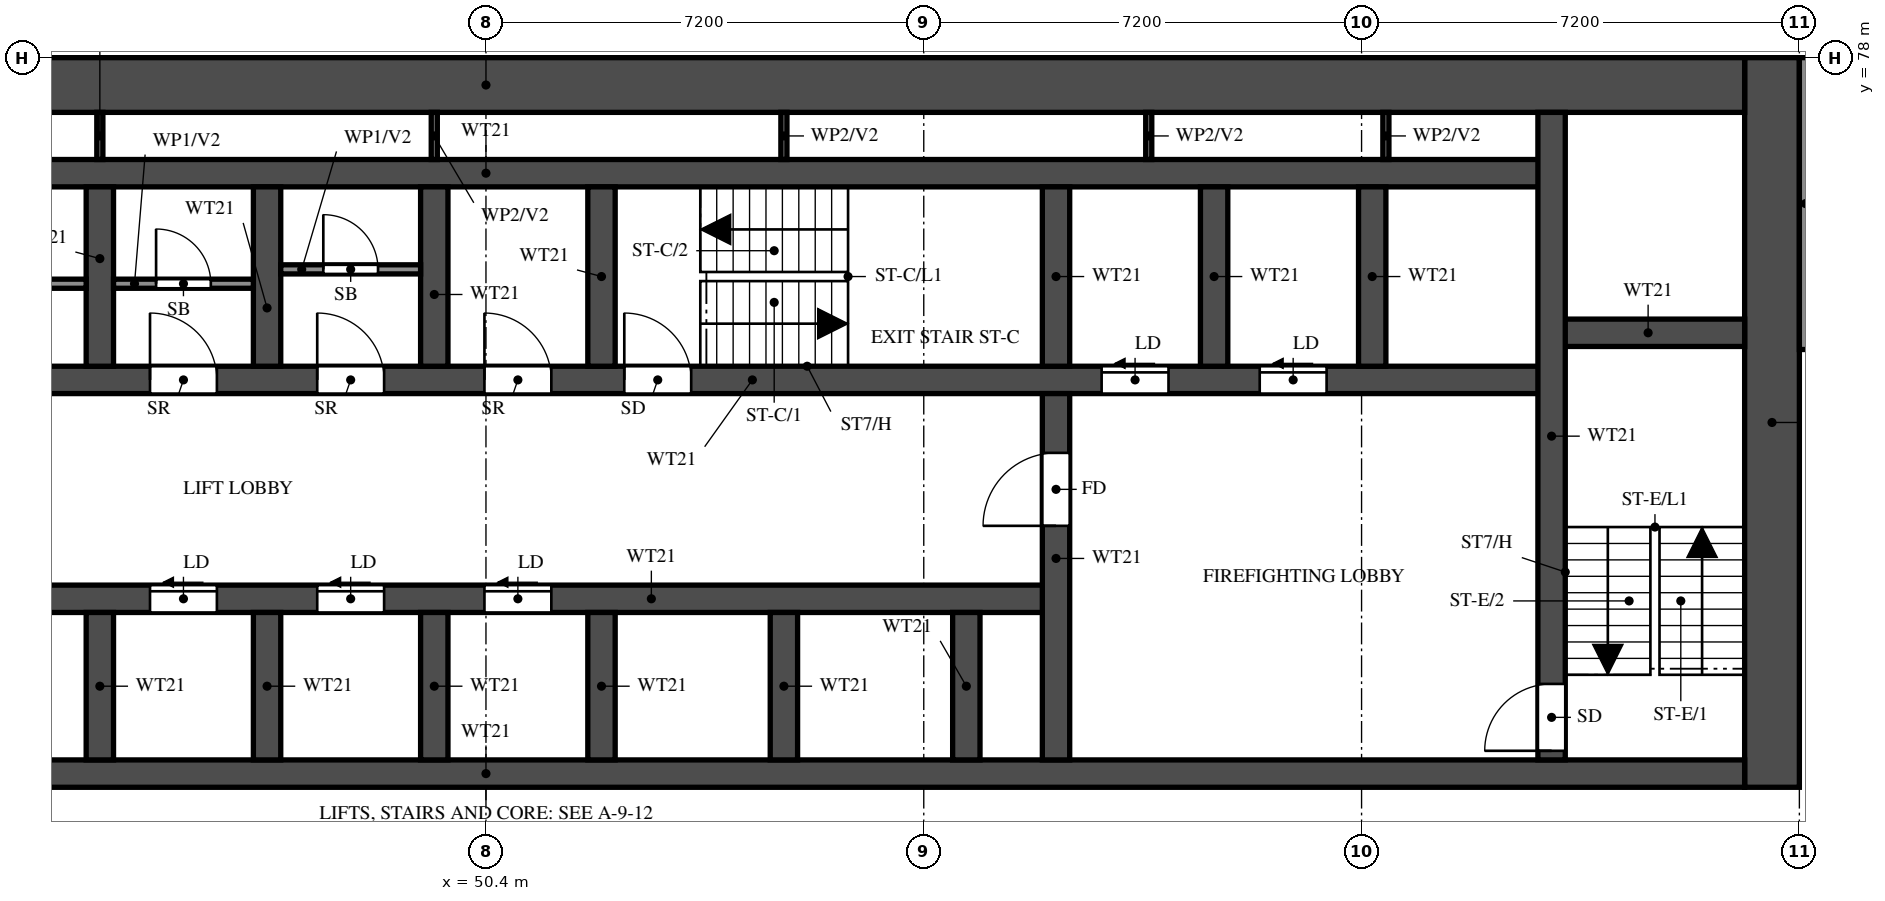
"""IFC4 building model, lengths in metres.
Left out: names, types, materials, properties, quantities, classifications, styles, units other than length and angle.
Written with IfcOpenShell. Run it as: python <this file> out.ifc"""

import sys

from ifc_helpers import new_model, si_unit, direction, frame, frame_2d, origin, place, context, subcontext, project, spatial, rectangle, extrude, element, fill, save


model = new_model("IFC4")
c1 = context("Model", 3, precision=1e-05, world=origin(), true_north=direction((0.0, 1.0)))
c2 = subcontext(c1, "Body", "Model", "MODEL_VIEW")
j1 = project(units=[si_unit("LENGTHUNIT", "METRE"), si_unit("PLANEANGLEUNIT", "RADIAN")], contexts=[c1])
p1 = place(None, origin())
s1 = spatial("IfcSite", under=j1, at=p1, CompositionType="ELEMENT")
p2 = place(p1, origin())
s2 = spatial("IfcBuilding", under=s1, at=p2, CompositionType="ELEMENT")
p3 = place(p2, frame((0.0, 0.0, 79.5)))
s3 = spatial("IfcBuildingStorey", under=s2, at=p3, CompositionType="ELEMENT", Elevation=79.5)
p4 = place(p3, frame((71.55, 66.0, 0.0), z_axis=(0.0, 0.0, 1.0), x_axis=(0.0, 1.0, 0.0)))
e1 = element("IfcWall", 1, at=p4, inside=s3, PredefinedType="SHEAR", context=c2, shape_type="SweptSolid", body=[
    extrude(rectangle(XDim=12.0, YDim=0.9, at=frame_2d((6.0, 0.0))), origin(), (0.0, 0.0, 1.0), 3.18),
])
p5 = place(p3, frame((29.7, 77.55, 0.0), z_axis=(0.0, 0.0, 1.0), x_axis=(1.0, 0.0, 0.0)))
e2 = element("IfcWall", 2, at=p5, inside=s3, PredefinedType="SHEAR", context=c2, shape_type="SweptSolid", body=[
    extrude(rectangle(XDim=41.4, YDim=0.9, at=frame_2d((20.7, 0.0))), origin(), (0.0, 0.0, 1.0), 3.18),
])
p6 = place(p3, frame((29.7, 66.225, 0.0), z_axis=(0.0, 0.0, 1.0), x_axis=(1.0, 0.0, 0.0)))
e3 = element("IfcWall", 3, at=p6, inside=s3, PredefinedType="SHEAR", context=c2, shape_type="SweptSolid", body=[
    extrude(rectangle(XDim=41.4, YDim=0.45, at=frame_2d((20.7, 0.0))), origin(), (0.0, 0.0, 1.0), 3.18),
])
p7 = place(p6, frame((0.925, 0.0, 0.0)))
e4 = element("IfcOpeningElement", 4, at=p7, cuts=e3, PredefinedType="OPENING", context=c2, shape_type="SweptSolid", body=[
    extrude(rectangle(XDim=1.1, YDim=2.1, at=frame_2d((0.55, 1.05))), frame((0.0, 0.235, 0.0), z_axis=(0.0, -1.0, 0.0), x_axis=(1.0, 0.0, 0.0)), (0.0, 0.0, 1.0), 0.47),
])
p8 = place(p6, frame((3.738, 0.0, 0.0)))
e5 = element("IfcOpeningElement", 5, at=p8, cuts=e3, PredefinedType="OPENING", context=c2, shape_type="SweptSolid", body=[
    extrude(rectangle(XDim=1.8, YDim=2.1, at=frame_2d((0.9, 1.05))), frame((0.0, 0.235, 0.0), z_axis=(0.0, -1.0, 0.0), x_axis=(1.0, 0.0, 0.0)), (0.0, 0.0, 1.0), 0.47),
])
p9 = place(p3, frame((35.575, 69.1, 0.0), z_axis=(0.0, 0.0, 1.0), x_axis=(1.0, 0.0, 0.0)))
e6 = element("IfcWall", 6, at=p9, inside=s3, PredefinedType="SHEAR", context=c2, shape_type="SweptSolid", body=[
    extrude(rectangle(XDim=24.2, YDim=0.45, at=frame_2d((12.1, 0.0))), origin(), (0.0, 0.0, 1.0), 3.18),
])
p10 = place(p9, frame((1.05, 0.0, 0.0)))
e7 = element("IfcOpeningElement", 7, at=p10, cuts=e6, PredefinedType="OPENING", context=c2, shape_type="SweptSolid", body=[
    extrude(rectangle(XDim=1.1, YDim=2.1, at=frame_2d((0.55, 1.05))), frame((0.0, 0.235, 0.0), z_axis=(0.0, -1.0, 0.0), x_axis=(1.0, 0.0, 0.0)), (0.0, 0.0, 1.0), 0.47),
])
p11 = place(p9, frame((3.8, 0.0, 0.0)))
e8 = element("IfcOpeningElement", 8, at=p11, cuts=e6, PredefinedType="OPENING", context=c2, shape_type="SweptSolid", body=[
    extrude(rectangle(XDim=1.1, YDim=2.1, at=frame_2d((0.55, 1.05))), frame((0.0, 0.235, 0.0), z_axis=(0.0, -1.0, 0.0), x_axis=(1.0, 0.0, 0.0)), (0.0, 0.0, 1.0), 0.47),
])
p12 = place(p9, frame((6.55, 0.0, 0.0)))
e9 = element("IfcOpeningElement", 9, at=p12, cuts=e6, PredefinedType="OPENING", context=c2, shape_type="SweptSolid", body=[
    extrude(rectangle(XDim=1.1, YDim=2.1, at=frame_2d((0.55, 1.05))), frame((0.0, 0.235, 0.0), z_axis=(0.0, -1.0, 0.0), x_axis=(1.0, 0.0, 0.0)), (0.0, 0.0, 1.0), 0.47),
])
p13 = place(p9, frame((9.3, 0.0, 0.0)))
e10 = element("IfcOpeningElement", 10, at=p13, cuts=e6, PredefinedType="OPENING", context=c2, shape_type="SweptSolid", body=[
    extrude(rectangle(XDim=1.1, YDim=2.1, at=frame_2d((0.55, 1.05))), frame((0.0, 0.235, 0.0), z_axis=(0.0, -1.0, 0.0), x_axis=(1.0, 0.0, 0.0)), (0.0, 0.0, 1.0), 0.47),
])
p14 = place(p9, frame((12.05, 0.0, 0.0)))
e11 = element("IfcOpeningElement", 11, at=p14, cuts=e6, PredefinedType="OPENING", context=c2, shape_type="SweptSolid", body=[
    extrude(rectangle(XDim=1.1, YDim=2.1, at=frame_2d((0.55, 1.05))), frame((0.0, 0.235, 0.0), z_axis=(0.0, -1.0, 0.0), x_axis=(1.0, 0.0, 0.0)), (0.0, 0.0, 1.0), 0.47),
])
p15 = place(p9, frame((14.8, 0.0, 0.0)))
e12 = element("IfcOpeningElement", 12, at=p15, cuts=e6, PredefinedType="OPENING", context=c2, shape_type="SweptSolid", body=[
    extrude(rectangle(XDim=1.1, YDim=2.1, at=frame_2d((0.55, 1.05))), frame((0.0, 0.235, 0.0), z_axis=(0.0, -1.0, 0.0), x_axis=(1.0, 0.0, 0.0)), (0.0, 0.0, 1.0), 0.47),
])
p16 = place(p3, frame((32.875, 72.7, 0.0), z_axis=(0.0, 0.0, 1.0), x_axis=(1.0, 0.0, 0.0)))
e13 = element("IfcWall", 13, at=p16, inside=s3, PredefinedType="SHEAR", context=c2, shape_type="SweptSolid", body=[
    extrude(rectangle(XDim=35.05, YDim=0.45, at=frame_2d((17.525, 0.0))), origin(), (0.0, 0.0, 1.0), 3.18),
])
p17 = place(p16, frame((19.8, 0.0, 0.0)))
e14 = element("IfcOpeningElement", 14, at=p17, cuts=e13, PredefinedType="OPENING", context=c2, shape_type="SweptSolid", body=[
    extrude(rectangle(XDim=1.1, YDim=2.1, at=frame_2d((0.55, 1.05))), frame((0.0, 0.235, 0.0), z_axis=(0.0, -1.0, 0.0), x_axis=(1.0, 0.0, 0.0)), (0.0, 0.0, 1.0), 0.47),
])
p18 = place(p16, frame((27.65, 0.0, 0.0)))
e15 = element("IfcOpeningElement", 15, at=p18, cuts=e13, PredefinedType="OPENING", context=c2, shape_type="SweptSolid", body=[
    extrude(rectangle(XDim=1.1, YDim=2.1, at=frame_2d((0.55, 1.05))), frame((0.0, 0.235, 0.0), z_axis=(0.0, -1.0, 0.0), x_axis=(1.0, 0.0, 0.0)), (0.0, 0.0, 1.0), 0.47),
])
p19 = place(p16, frame((30.25, 0.0, 0.0)))
e16 = element("IfcOpeningElement", 16, at=p19, cuts=e13, PredefinedType="OPENING", context=c2, shape_type="SweptSolid", body=[
    extrude(rectangle(XDim=1.1, YDim=2.1, at=frame_2d((0.55, 1.05))), frame((0.0, 0.235, 0.0), z_axis=(0.0, -1.0, 0.0), x_axis=(1.0, 0.0, 0.0)), (0.0, 0.0, 1.0), 0.47),
])
p20 = place(p16, frame((3.75, 0.0, 0.0)))
e17 = element("IfcOpeningElement", 17, at=p20, cuts=e13, PredefinedType="OPENING", context=c2, shape_type="SweptSolid", body=[
    extrude(rectangle(XDim=1.1, YDim=2.1, at=frame_2d((0.55, 1.05))), frame((0.0, 0.235, 0.0), z_axis=(0.0, -1.0, 0.0), x_axis=(1.0, 0.0, 0.0)), (0.0, 0.0, 1.0), 0.47),
])
p21 = place(p16, frame((6.5, 0.0, 0.0)))
e18 = element("IfcOpeningElement", 18, at=p21, cuts=e13, PredefinedType="OPENING", context=c2, shape_type="SweptSolid", body=[
    extrude(rectangle(XDim=1.1, YDim=2.1, at=frame_2d((0.55, 1.05))), frame((0.0, 0.235, 0.0), z_axis=(0.0, -1.0, 0.0), x_axis=(1.0, 0.0, 0.0)), (0.0, 0.0, 1.0), 0.47),
])
p22 = place(p16, frame((9.25, 0.0, 0.0)))
e19 = element("IfcOpeningElement", 19, at=p22, cuts=e13, PredefinedType="OPENING", context=c2, shape_type="SweptSolid", body=[
    extrude(rectangle(XDim=1.1, YDim=2.1, at=frame_2d((0.55, 1.05))), frame((0.0, 0.235, 0.0), z_axis=(0.0, -1.0, 0.0), x_axis=(1.0, 0.0, 0.0)), (0.0, 0.0, 1.0), 0.47),
])
p23 = place(p16, frame((12.0, 0.0, 0.0)))
e20 = element("IfcOpeningElement", 20, at=p23, cuts=e13, PredefinedType="OPENING", context=c2, shape_type="SweptSolid", body=[
    extrude(rectangle(XDim=1.1, YDim=2.1, at=frame_2d((0.55, 1.05))), frame((0.0, 0.235, 0.0), z_axis=(0.0, -1.0, 0.0), x_axis=(1.0, 0.0, 0.0)), (0.0, 0.0, 1.0), 0.47),
])
p24 = place(p16, frame((14.75, 0.0, 0.0)))
e21 = element("IfcOpeningElement", 21, at=p24, cuts=e13, PredefinedType="OPENING", context=c2, shape_type="SweptSolid", body=[
    extrude(rectangle(XDim=1.1, YDim=2.1, at=frame_2d((0.55, 1.05))), frame((0.0, 0.235, 0.0), z_axis=(0.0, -1.0, 0.0), x_axis=(1.0, 0.0, 0.0)), (0.0, 0.0, 1.0), 0.47),
])
p25 = place(p16, frame((17.5, 0.0, 0.0)))
e22 = element("IfcOpeningElement", 22, at=p25, cuts=e13, PredefinedType="OPENING", context=c2, shape_type="SweptSolid", body=[
    extrude(rectangle(XDim=1.1, YDim=2.1, at=frame_2d((0.55, 1.05))), frame((0.0, 0.235, 0.0), z_axis=(0.0, -1.0, 0.0), x_axis=(1.0, 0.0, 0.0)), (0.0, 0.0, 1.0), 0.47),
])
p26 = place(p16, frame((0.913, 0.0, 0.0)))
e23 = element("IfcOpeningElement", 23, at=p26, cuts=e13, PredefinedType="OPENING", context=c2, shape_type="SweptSolid", body=[
    extrude(rectangle(XDim=1.1, YDim=2.1, at=frame_2d((0.55, 1.05))), frame((0.0, 0.235, 0.0), z_axis=(0.0, -1.0, 0.0), x_axis=(1.0, 0.0, 0.0)), (0.0, 0.0, 1.0), 0.47),
])
p27 = place(p3, frame((32.875, 76.1, 0.0), z_axis=(0.0, 0.0, 1.0), x_axis=(1.0, 0.0, 0.0)))
e24 = element("IfcWall", 24, at=p27, inside=s3, PredefinedType="SHEAR", context=c2, shape_type="SweptSolid", body=[
    extrude(rectangle(XDim=35.05, YDim=0.45, at=frame_2d((17.525, 0.0))), origin(), (0.0, 0.0, 1.0), 3.18),
])
p28 = place(p3, frame((67.925, 73.475, 0.0), z_axis=(0.0, 0.0, 1.0), x_axis=(1.0, 0.0, 0.0)))
e25 = element("IfcWall", 25, at=p28, inside=s3, PredefinedType="SHEAR", context=c2, shape_type="SweptSolid", body=[
    extrude(rectangle(XDim=3.175, YDim=0.45, at=frame_2d((1.587, 0.0))), origin(), (0.0, 0.0, 1.0), 3.18),
])
p29 = place(p3, frame((67.925, 66.45, 0.0), z_axis=(0.0, 0.0, 1.0), x_axis=(0.0, 1.0, 0.0)))
e26 = element("IfcWall", 26, at=p29, inside=s3, PredefinedType="SHEAR", context=c2, shape_type="SweptSolid", body=[
    extrude(rectangle(XDim=10.65, YDim=0.45, at=frame_2d((5.325, 0.0))), origin(), (0.0, 0.0, 1.0), 3.18),
])
p30 = place(p29, frame((0.15, 0.0, 0.0)))
e27 = element("IfcOpeningElement", 27, at=p30, cuts=e26, PredefinedType="OPENING", context=c2, shape_type="SweptSolid", body=[
    extrude(rectangle(XDim=1.1, YDim=2.1, at=frame_2d((0.55, 1.05))), frame((0.0, 0.235, 0.0), z_axis=(0.0, -1.0, 0.0), x_axis=(1.0, 0.0, 0.0)), (0.0, 0.0, 1.0), 0.47),
])
p31 = place(p3, frame((59.775, 66.45, 0.0), z_axis=(0.0, 0.0, 1.0), x_axis=(0.0, 1.0, 0.0)))
e28 = element("IfcWall", 28, at=p31, inside=s3, PredefinedType="SHEAR", context=c2, shape_type="SweptSolid", body=[
    extrude(rectangle(XDim=6.025, YDim=0.45, at=frame_2d((3.013, 0.0))), origin(), (0.0, 0.0, 1.0), 3.18),
])
p32 = place(p31, frame((3.85, 0.0, 0.0)))
e29 = element("IfcOpeningElement", 29, at=p32, cuts=e28, PredefinedType="OPENING", context=c2, shape_type="SweptSolid", body=[
    extrude(rectangle(XDim=1.2, YDim=2.1, at=frame_2d((0.6, 1.05))), frame((0.0, 0.235, 0.0), z_axis=(0.0, -1.0, 0.0), x_axis=(1.0, 0.0, 0.0)), (0.0, 0.0, 1.0), 0.47),
])
p33 = place(p3, frame((59.775, 72.925, 0.0), z_axis=(0.0, 0.0, 1.0), x_axis=(0.0, 1.0, 0.0)))
e30 = element("IfcWall", 30, at=p33, inside=s3, PredefinedType="SHEAR", context=c2, shape_type="SweptSolid", body=[
    extrude(rectangle(XDim=2.95, YDim=0.45, at=frame_2d((1.475, 0.0))), origin(), (0.0, 0.0, 1.0), 3.18),
])
for number, where, z_axis, x_axis in (
    (31, (44.05, 66.45, 0.0), (0.0, 0.0, 1.0), (0.0, 1.0, 0.0)),
    (32, (46.8, 66.45, 0.0), (0.0, 0.0, 1.0), (0.0, 1.0, 0.0)),
    (33, (49.55, 66.45, 0.0), (0.0, 0.0, 1.0), (0.0, 1.0, 0.0)),
    (34, (52.3, 66.45, 0.0), (0.0, 0.0, 1.0), (0.0, 1.0, 0.0)),
    (35, (55.3, 66.45, 0.0), (0.0, 0.0, 1.0), (0.0, 1.0, 0.0)),
    (36, (58.3, 66.45, 0.0), (0.0, 0.0, 1.0), (0.0, 1.0, 0.0)),
):
    element("IfcWall", number, at=place(p3, frame(where, z_axis=z_axis, x_axis=x_axis)), inside=s3, PredefinedType="SHEAR", context=c2, shape_type="SweptSolid", body=[
        extrude(rectangle(XDim=2.425, YDim=0.45, at=frame_2d((1.212, 0.0))), origin(), (0.0, 0.0, 1.0), 3.18),
    ])
for number, where, z_axis, x_axis in (
    (37, (44.05, 72.925, 0.0), (0.0, 0.0, 1.0), (0.0, 1.0, 0.0)),
    (38, (46.8, 72.925, 0.0), (0.0, 0.0, 1.0), (0.0, 1.0, 0.0)),
    (39, (49.55, 72.925, 0.0), (0.0, 0.0, 1.0), (0.0, 1.0, 0.0)),
    (40, (52.3, 72.925, 0.0), (0.0, 0.0, 1.0), (0.0, 1.0, 0.0)),
    (41, (62.375, 72.925, 0.0), (0.0, 0.0, 1.0), (0.0, 1.0, 0.0)),
    (42, (64.975, 72.925, 0.0), (0.0, 0.0, 1.0), (0.0, 1.0, 0.0)),
):
    element("IfcWall", number, at=place(p3, frame(where, z_axis=z_axis, x_axis=x_axis)), inside=s3, PredefinedType="SHEAR", context=c2, shape_type="SweptSolid", body=[
        extrude(rectangle(XDim=2.95, YDim=0.45, at=frame_2d((1.475, 0.0))), origin(), (0.0, 0.0, 1.0), 3.18),
    ])
p34 = place(p3, frame((41.525, 74.282, 0.0), z_axis=(0.0, 0.0, 1.0), x_axis=(1.0, 0.0, 0.0)))
e43 = element("IfcWall", 43, at=p34, inside=s3, PredefinedType="PARTITIONING", context=c2, shape_type="SweptSolid", body=[
    extrude(rectangle(XDim=2.3, YDim=0.15, at=frame_2d((1.15, 0.0))), origin(), (0.0, 0.0, 1.0), 3.18),
])
p35 = place(p34, frame((0.7, 0.0, 0.0)))
e44 = element("IfcOpeningElement", 44, at=p35, cuts=e43, PredefinedType="OPENING", context=c2, shape_type="SweptSolid", body=[
    extrude(rectangle(XDim=0.9, YDim=2.1, at=frame_2d((0.45, 1.05))), frame((0.0, 0.085, 0.0), z_axis=(0.0, -1.0, 0.0), x_axis=(1.0, 0.0, 0.0)), (0.0, 0.0, 1.0), 0.17),
])
p36 = place(p3, frame((44.275, 74.282, 0.0), z_axis=(0.0, 0.0, 1.0), x_axis=(1.0, 0.0, 0.0)))
e45 = element("IfcWall", 45, at=p36, inside=s3, PredefinedType="PARTITIONING", context=c2, shape_type="SweptSolid", body=[
    extrude(rectangle(XDim=2.3, YDim=0.15, at=frame_2d((1.15, 0.0))), origin(), (0.0, 0.0, 1.0), 3.18),
])
p37 = place(p36, frame((0.7, 0.0, 0.0)))
e46 = element("IfcOpeningElement", 46, at=p37, cuts=e45, PredefinedType="OPENING", context=c2, shape_type="SweptSolid", body=[
    extrude(rectangle(XDim=0.9, YDim=2.1, at=frame_2d((0.45, 1.05))), frame((0.0, 0.085, 0.0), z_axis=(0.0, -1.0, 0.0), x_axis=(1.0, 0.0, 0.0)), (0.0, 0.0, 1.0), 0.17),
])
p38 = place(p3, frame((47.025, 74.518, 0.0), z_axis=(0.0, 0.0, 1.0), x_axis=(1.0, 0.0, 0.0)))
e47 = element("IfcWall", 47, at=p38, inside=s3, PredefinedType="PARTITIONING", context=c2, shape_type="SweptSolid", body=[
    extrude(rectangle(XDim=2.3, YDim=0.15, at=frame_2d((1.15, 0.0))), origin(), (0.0, 0.0, 1.0), 3.18),
])
p39 = place(p38, frame((0.7, 0.0, 0.0)))
e48 = element("IfcOpeningElement", 48, at=p39, cuts=e47, PredefinedType="OPENING", context=c2, shape_type="SweptSolid", body=[
    extrude(rectangle(XDim=0.9, YDim=2.1, at=frame_2d((0.45, 1.05))), frame((0.0, 0.085, 0.0), z_axis=(0.0, -1.0, 0.0), x_axis=(1.0, 0.0, 0.0)), (0.0, 0.0, 1.0), 0.17),
])
for number, where, z_axis, x_axis in (
    (49, (44.05, 76.325, 0.0), (0.0, 0.0, 1.0), (0.0, 1.0, 0.0)),
    (50, (49.55, 76.325, 0.0), (0.0, 0.0, 1.0), (0.0, 1.0, 0.0)),
    (51, (55.3, 76.325, 0.0), (0.0, 0.0, 1.0), (0.0, 1.0, 0.0)),
    (52, (61.3, 76.325, 0.0), (0.0, 0.0, 1.0), (0.0, 1.0, 0.0)),
    (53, (65.2, 76.325, 0.0), (0.0, 0.0, 1.0), (0.0, 1.0, 0.0)),
):
    element("IfcWall", number, at=place(p3, frame(where, z_axis=z_axis, x_axis=x_axis)), inside=s3, PredefinedType="PARTITIONING", context=c2, shape_type="SweptSolid", body=[
        extrude(rectangle(XDim=0.775, YDim=0.1, at=frame_2d((0.388, 0.0))), origin(), (0.0, 0.0, 1.0), 3.18),
    ])
p40 = place(p3, frame((72.1, 73.2, 0.0), z_axis=(0.0, 0.0, 1.0), x_axis=(0.0, 1.0, 0.0)))
e54 = element("IfcWall", 54, at=p40, inside=s3, PredefinedType="SOLIDWALL", context=c2, shape_type="SweptSolid", body=[
    extrude(rectangle(XDim=4.8, YDim=0.2, at=frame_2d((2.4, 0.0))), origin(), (0.0, 0.0, 1.0), 3.18),
])
p41 = place(p17, origin())
e55 = element("IfcDoor", 55, at=p41, inside=s3, OperationType="SINGLE_SWING_LEFT", PredefinedType="DOOR", context=c2, shape_type="SweptSolid", body=[
    extrude(rectangle(XDim=1.1, YDim=2.1, at=frame_2d((0.55, 1.05))), frame((0.0, 0.025, 0.0), z_axis=(0.0, -1.0, 0.0), x_axis=(1.0, 0.0, 0.0)), (0.0, 0.0, 1.0), 0.05),
])
fill(e14, e55)
p42 = place(p30, origin())
e56 = element("IfcDoor", 56, at=p42, inside=s3, OperationType="SINGLE_SWING_LEFT", PredefinedType="DOOR", context=c2, shape_type="SweptSolid", body=[
    extrude(rectangle(XDim=1.1, YDim=2.1, at=frame_2d((0.55, 1.05))), frame((0.0, 0.025, 0.0), z_axis=(0.0, -1.0, 0.0), x_axis=(1.0, 0.0, 0.0)), (0.0, 0.0, 1.0), 0.05),
])
fill(e27, e56)
p43 = place(p32, origin())
e57 = element("IfcDoor", 57, at=p43, inside=s3, OperationType="SINGLE_SWING_RIGHT", PredefinedType="DOOR", context=c2, shape_type="SweptSolid", body=[
    extrude(rectangle(XDim=1.2, YDim=2.1, at=frame_2d((0.6, 1.05))), frame((0.0, 0.025, 0.0), z_axis=(0.0, -1.0, 0.0), x_axis=(1.0, 0.0, 0.0)), (0.0, 0.0, 1.0), 0.05),
])
fill(e29, e57)
p44 = place(p18, origin())
e58 = element("IfcDoor", 58, at=p44, inside=s3, OperationType="SLIDING_TO_LEFT", PredefinedType="DOOR", context=c2, shape_type="SweptSolid", body=[
    extrude(rectangle(XDim=1.1, YDim=2.1, at=frame_2d((0.55, 1.05))), frame((0.0, 0.025, 0.0), z_axis=(0.0, -1.0, 0.0), x_axis=(1.0, 0.0, 0.0)), (0.0, 0.0, 1.0), 0.05),
])
fill(e15, e58)
p45 = place(p19, origin())
e59 = element("IfcDoor", 59, at=p45, inside=s3, OperationType="SLIDING_TO_LEFT", PredefinedType="DOOR", context=c2, shape_type="SweptSolid", body=[
    extrude(rectangle(XDim=1.1, YDim=2.1, at=frame_2d((0.55, 1.05))), frame((0.0, 0.025, 0.0), z_axis=(0.0, -1.0, 0.0), x_axis=(1.0, 0.0, 0.0)), (0.0, 0.0, 1.0), 0.05),
])
fill(e16, e59)
p46 = place(p13, origin())
e60 = element("IfcDoor", 60, at=p46, inside=s3, OperationType="SLIDING_TO_LEFT", PredefinedType="DOOR", context=c2, shape_type="SweptSolid", body=[
    extrude(rectangle(XDim=1.1, YDim=2.1, at=frame_2d((0.55, 1.05))), frame((0.0, 0.025, 0.0), z_axis=(0.0, -1.0, 0.0), x_axis=(1.0, 0.0, 0.0)), (0.0, 0.0, 1.0), 0.05),
])
fill(e10, e60)
p47 = place(p14, origin())
e61 = element("IfcDoor", 61, at=p47, inside=s3, OperationType="SLIDING_TO_LEFT", PredefinedType="DOOR", context=c2, shape_type="SweptSolid", body=[
    extrude(rectangle(XDim=1.1, YDim=2.1, at=frame_2d((0.55, 1.05))), frame((0.0, 0.025, 0.0), z_axis=(0.0, -1.0, 0.0), x_axis=(1.0, 0.0, 0.0)), (0.0, 0.0, 1.0), 0.05),
])
fill(e11, e61)
p48 = place(p15, origin())
e62 = element("IfcDoor", 62, at=p48, inside=s3, OperationType="SLIDING_TO_LEFT", PredefinedType="DOOR", context=c2, shape_type="SweptSolid", body=[
    extrude(rectangle(XDim=1.1, YDim=2.1, at=frame_2d((0.55, 1.05))), frame((0.0, 0.025, 0.0), z_axis=(0.0, -1.0, 0.0), x_axis=(1.0, 0.0, 0.0)), (0.0, 0.0, 1.0), 0.05),
])
fill(e12, e62)
p49 = place(p23, origin())
e63 = element("IfcDoor", 63, at=p49, inside=s3, OperationType="SINGLE_SWING_LEFT", PredefinedType="DOOR", context=c2, shape_type="SweptSolid", body=[
    extrude(rectangle(XDim=1.1, YDim=2.1, at=frame_2d((0.55, 1.05))), frame((0.0, 0.025, 0.0), z_axis=(0.0, -1.0, 0.0), x_axis=(1.0, 0.0, 0.0)), (0.0, 0.0, 1.0), 0.05),
])
fill(e20, e63)
p50 = place(p37, origin())
e64 = element("IfcDoor", 64, at=p50, inside=s3, OperationType="SINGLE_SWING_RIGHT", PredefinedType="DOOR", context=c2, shape_type="SweptSolid", body=[
    extrude(rectangle(XDim=0.9, YDim=2.1, at=frame_2d((0.45, 1.05))), frame((0.0, 0.025, 0.0), z_axis=(0.0, -1.0, 0.0), x_axis=(1.0, 0.0, 0.0)), (0.0, 0.0, 1.0), 0.05),
])
fill(e46, e64)
p51 = place(p24, origin())
e65 = element("IfcDoor", 65, at=p51, inside=s3, OperationType="SINGLE_SWING_LEFT", PredefinedType="DOOR", context=c2, shape_type="SweptSolid", body=[
    extrude(rectangle(XDim=1.1, YDim=2.1, at=frame_2d((0.55, 1.05))), frame((0.0, 0.025, 0.0), z_axis=(0.0, -1.0, 0.0), x_axis=(1.0, 0.0, 0.0)), (0.0, 0.0, 1.0), 0.05),
])
fill(e21, e65)
p52 = place(p39, origin())
e66 = element("IfcDoor", 66, at=p52, inside=s3, OperationType="SINGLE_SWING_RIGHT", PredefinedType="DOOR", context=c2, shape_type="SweptSolid", body=[
    extrude(rectangle(XDim=0.9, YDim=2.1, at=frame_2d((0.45, 1.05))), frame((0.0, 0.025, 0.0), z_axis=(0.0, -1.0, 0.0), x_axis=(1.0, 0.0, 0.0)), (0.0, 0.0, 1.0), 0.05),
])
fill(e48, e66)
p53 = place(p25, origin())
e67 = element("IfcDoor", 67, at=p53, inside=s3, OperationType="SINGLE_SWING_LEFT", PredefinedType="DOOR", context=c2, shape_type="SweptSolid", body=[
    extrude(rectangle(XDim=1.1, YDim=2.1, at=frame_2d((0.55, 1.05))), frame((0.0, 0.025, 0.0), z_axis=(0.0, -1.0, 0.0), x_axis=(1.0, 0.0, 0.0)), (0.0, 0.0, 1.0), 0.05),
])
fill(e22, e67)
save(model, sys.argv[1])
